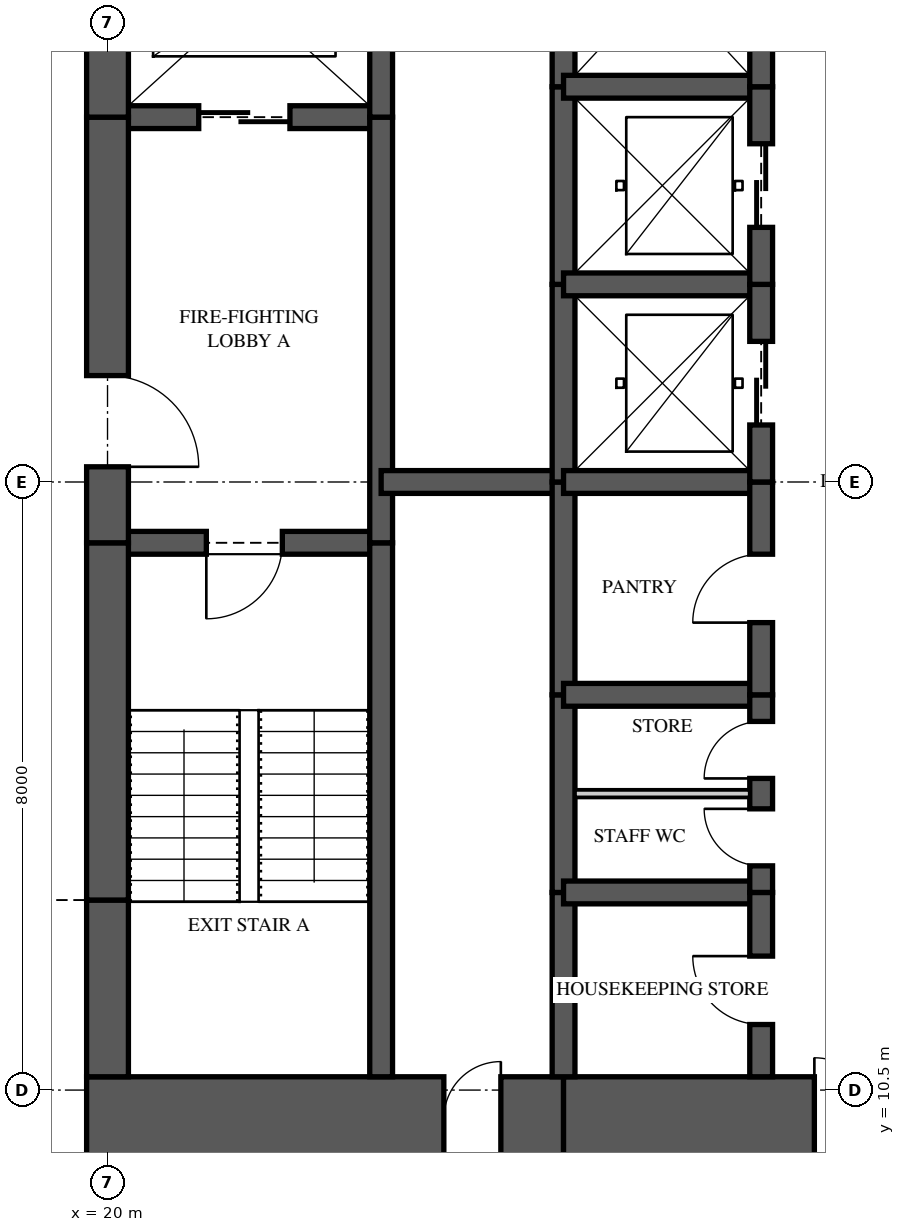
"""IFC4 building model, lengths in metres.
Left out: names, types, materials, properties, quantities, classifications, styles, units other than length and angle.
Written with IfcOpenShell. Run it as: python <this file> out.ifc"""

import sys

from ifc_helpers import new_model, si_unit, direction, frame, frame_2d, origin, place, context, subcontext, project, spatial, rectangle, extrude, element, fill, save


model = new_model("IFC4")
c1 = context("Model", 3, precision=1e-05, world=origin(), true_north=direction((0.0, 1.0)))
c2 = subcontext(c1, "Body", "Model", "MODEL_VIEW")
j1 = project(units=[si_unit("LENGTHUNIT", "METRE"), si_unit("PLANEANGLEUNIT", "RADIAN")], contexts=[c1])
p1 = place(None, origin())
s1 = spatial("IfcSite", under=j1, at=p1, CompositionType="ELEMENT")
p2 = place(p1, origin())
s2 = spatial("IfcBuilding", under=s1, at=p2, CompositionType="ELEMENT")
p3 = place(p2, frame((0.0, 0.0, 224.95)))
s3 = spatial("IfcBuildingStorey", under=s2, at=p3, CompositionType="ELEMENT", Elevation=224.95)
p4 = place(p3, frame((19.725, 10.125, 0.0), z_axis=(0.0, 0.0, 1.0), x_axis=(1.0, 0.0, 0.0)))
e1 = element("IfcWall", 1, at=p4, inside=s3, PredefinedType="SHEAR", context=c2, shape_type="SweptSolid", body=[
    extrude(rectangle(XDim=6.275, YDim=1.1, at=frame_2d((3.137, 0.0))), origin(), (0.0, 0.0, 1.0), 3.5),
])
p5 = place(p4, frame((4.7, 0.0, 0.0)))
e2 = element("IfcOpeningElement", 2, at=p5, cuts=e1, PredefinedType="OPENING", context=c2, shape_type="SweptSolid", body=[
    extrude(rectangle(XDim=0.75, YDim=2.1, at=frame_2d((0.375, 1.05))), frame((0.0, 0.56, 0.0), z_axis=(0.0, -1.0, 0.0), x_axis=(1.0, 0.0, 0.0)), (0.0, 0.0, 1.0), 1.12),
])
p6 = place(p3, frame((26.0, 10.125, 0.0), z_axis=(0.0, 0.0, 1.0), x_axis=(1.0, 0.0, 0.0)))
e3 = element("IfcWall", 3, at=p6, inside=s3, PredefinedType="SHEAR", context=c2, shape_type="SweptSolid", body=[
    extrude(rectangle(XDim=5.6, YDim=1.1, at=frame_2d((2.8, 0.0))), origin(), (0.0, 0.0, 1.0), 3.5),
])
p7 = place(p6, frame((3.3, 0.0, 0.0)))
e4 = element("IfcOpeningElement", 4, at=p7, cuts=e3, PredefinedType="OPENING", context=c2, shape_type="SweptSolid", body=[
    extrude(rectangle(XDim=1.6, YDim=2.1, at=frame_2d((0.8, 1.05))), frame((0.0, 0.56, 0.0), z_axis=(0.0, -1.0, 0.0), x_axis=(1.0, 0.0, 0.0)), (0.0, 0.0, 1.0), 1.12),
])
p8 = place(p3, frame((20.0, 26.325, 0.0), z_axis=(0.0, 0.0, 1.0), x_axis=(0.0, -1.0, 0.0)))
e5 = element("IfcWall", 5, at=p8, inside=s3, PredefinedType="SHEAR", context=c2, shape_type="SweptSolid", body=[
    extrude(rectangle(XDim=3.025, YDim=0.55, at=frame_2d((1.512, 0.0))), origin(), (0.0, 0.0, 1.0), 3.5),
])
p9 = place(p3, frame((20.0, 23.3, 0.0), z_axis=(0.0, 0.0, 1.0), x_axis=(0.0, -1.0, 0.0)))
e6 = element("IfcWall", 6, at=p9, inside=s3, PredefinedType="SHEAR", context=c2, shape_type="SweptSolid", body=[
    extrude(rectangle(XDim=5.6, YDim=0.55, at=frame_2d((2.8, 0.0))), origin(), (0.0, 0.0, 1.0), 3.5),
])
p10 = place(p9, frame((3.4, 0.0, 0.0)))
e7 = element("IfcOpeningElement", 7, at=p10, cuts=e6, PredefinedType="OPENING", context=c2, shape_type="SweptSolid", body=[
    extrude(rectangle(XDim=1.2, YDim=2.2, at=frame_2d((0.6, 1.1))), frame((0.0, 0.285, 0.0), z_axis=(0.0, -1.0, 0.0), x_axis=(1.0, 0.0, 0.0)), (0.0, 0.0, 1.0), 0.57),
])
p11 = place(p3, frame((20.0, 17.7, 0.0), z_axis=(0.0, 0.0, 1.0), x_axis=(0.0, -1.0, 0.0)))
e8 = element("IfcWall", 8, at=p11, inside=s3, PredefinedType="SHEAR", context=c2, shape_type="SweptSolid", body=[
    extrude(rectangle(XDim=4.7, YDim=0.55, at=frame_2d((2.35, 0.0))), origin(), (0.0, 0.0, 1.0), 3.5),
])
p12 = place(p3, frame((20.0, 13.0, 0.0), z_axis=(0.0, 0.0, 1.0), x_axis=(0.0, -1.0, 0.0)))
e9 = element("IfcWall", 9, at=p12, inside=s3, PredefinedType="SHEAR", context=c2, shape_type="SweptSolid", body=[
    extrude(rectangle(XDim=2.325, YDim=0.55, at=frame_2d((1.163, 0.0))), origin(), (0.0, 0.0, 1.0), 3.5),
])
p13 = place(p3, frame((23.6, 10.675, 0.0), z_axis=(0.0, 0.0, 1.0), x_axis=(0.0, 1.0, 0.0)))
e10 = element("IfcWall", 10, at=p13, inside=s3, PredefinedType="SHEAR", context=c2, shape_type="SweptSolid", body=[
    extrude(rectangle(XDim=7.025, YDim=0.3, at=frame_2d((3.512, 0.0))), origin(), (0.0, 0.0, 1.0), 3.5),
])
p14 = place(p3, frame((23.6, 17.7, 0.0), z_axis=(0.0, 0.0, 1.0), x_axis=(0.0, 1.0, 0.0)))
e11 = element("IfcWall", 11, at=p14, inside=s3, PredefinedType="SHEAR", context=c2, shape_type="SweptSolid", body=[
    extrude(rectangle(XDim=5.6, YDim=0.3, at=frame_2d((2.8, 0.0))), origin(), (0.0, 0.0, 1.0), 3.5),
])
p15 = place(p3, frame((23.6, 23.3, 0.0), z_axis=(0.0, 0.0, 1.0), x_axis=(0.0, 1.0, 0.0)))
e12 = element("IfcWall", 12, at=p15, inside=s3, PredefinedType="SHEAR", context=c2, shape_type="SweptSolid", body=[
    extrude(rectangle(XDim=3.025, YDim=0.3, at=frame_2d((1.512, 0.0))), origin(), (0.0, 0.0, 1.0), 3.5),
])
p16 = place(p3, frame((26.0, 10.675, 0.0), z_axis=(0.0, 0.0, 1.0), x_axis=(0.0, 1.0, 0.0)))
e13 = element("IfcWall", 13, at=p16, inside=s3, PredefinedType="SHEAR", context=c2, shape_type="SweptSolid", body=[
    extrude(rectangle(XDim=2.425, YDim=0.3, at=frame_2d((1.212, 0.0))), origin(), (0.0, 0.0, 1.0), 3.5),
])
p17 = place(p3, frame((26.0, 13.1, 0.0), z_axis=(0.0, 0.0, 1.0), x_axis=(0.0, 1.0, 0.0)))
e14 = element("IfcWall", 14, at=p17, inside=s3, PredefinedType="SHEAR", context=c2, shape_type="SweptSolid", body=[
    extrude(rectangle(XDim=2.6, YDim=0.3, at=frame_2d((1.3, 0.0))), origin(), (0.0, 0.0, 1.0), 3.5),
])
p18 = place(p3, frame((26.0, 15.7, 0.0), z_axis=(0.0, 0.0, 1.0), x_axis=(0.0, 1.0, 0.0)))
e15 = element("IfcWall", 15, at=p18, inside=s3, PredefinedType="SHEAR", context=c2, shape_type="SweptSolid", body=[
    extrude(rectangle(XDim=2.8, YDim=0.3, at=frame_2d((1.4, 0.0))), origin(), (0.0, 0.0, 1.0), 3.5),
])
p19 = place(p3, frame((26.0, 18.5, 0.0), z_axis=(0.0, 0.0, 1.0), x_axis=(0.0, 1.0, 0.0)))
e16 = element("IfcWall", 16, at=p19, inside=s3, PredefinedType="SHEAR", context=c2, shape_type="SweptSolid", body=[
    extrude(rectangle(XDim=2.6, YDim=0.3, at=frame_2d((1.3, 0.0))), origin(), (0.0, 0.0, 1.0), 3.5),
])
p20 = place(p3, frame((26.0, 21.1, 0.0), z_axis=(0.0, 0.0, 1.0), x_axis=(0.0, 1.0, 0.0)))
e17 = element("IfcWall", 17, at=p20, inside=s3, PredefinedType="SHEAR", context=c2, shape_type="SweptSolid", body=[
    extrude(rectangle(XDim=2.6, YDim=0.3, at=frame_2d((1.3, 0.0))), origin(), (0.0, 0.0, 1.0), 3.5),
])
p21 = place(p3, frame((26.0, 23.7, 0.0), z_axis=(0.0, 0.0, 1.0), x_axis=(0.0, 1.0, 0.0)))
e18 = element("IfcWall", 18, at=p21, inside=s3, PredefinedType="SHEAR", context=c2, shape_type="SweptSolid", body=[
    extrude(rectangle(XDim=2.625, YDim=0.3, at=frame_2d((1.312, 0.0))), origin(), (0.0, 0.0, 1.0), 3.5),
])
p22 = place(p3, frame((28.6, 10.675, 0.0), z_axis=(0.0, 0.0, 1.0), x_axis=(0.0, 1.0, 0.0)))
e19 = element("IfcWall", 19, at=p22, inside=s3, PredefinedType="SHEAR", context=c2, shape_type="SweptSolid", body=[
    extrude(rectangle(XDim=2.425, YDim=0.3, at=frame_2d((1.212, 0.0))), origin(), (0.0, 0.0, 1.0), 3.5),
])
p23 = place(p22, frame((0.688, 0.0, 0.0)))
e20 = element("IfcOpeningElement", 20, at=p23, cuts=e19, PredefinedType="OPENING", context=c2, shape_type="SweptSolid", body=[
    extrude(rectangle(XDim=0.9, YDim=2.1, at=frame_2d((0.45, 1.05))), frame((0.0, 0.16, 0.0), z_axis=(0.0, -1.0, 0.0), x_axis=(1.0, 0.0, 0.0)), (0.0, 0.0, 1.0), 0.32),
])
p24 = place(p3, frame((28.6, 13.1, 0.0), z_axis=(0.0, 0.0, 1.0), x_axis=(0.0, 1.0, 0.0)))
e21 = element("IfcWall", 21, at=p24, inside=s3, PredefinedType="SHEAR", context=c2, shape_type="SweptSolid", body=[
    extrude(rectangle(XDim=2.6, YDim=0.3, at=frame_2d((1.3, 0.0))), origin(), (0.0, 0.0, 1.0), 3.5),
])
p25 = place(p24, frame((0.35, 0.0, 0.0)))
e22 = element("IfcOpeningElement", 22, at=p25, cuts=e21, PredefinedType="OPENING", context=c2, shape_type="SweptSolid", body=[
    extrude(rectangle(XDim=0.75, YDim=2.1, at=frame_2d((0.375, 1.05))), frame((0.0, 0.16, 0.0), z_axis=(0.0, -1.0, 0.0), x_axis=(1.0, 0.0, 0.0)), (0.0, 0.0, 1.0), 0.32),
])
p26 = place(p24, frame((1.5, 0.0, 0.0)))
e23 = element("IfcOpeningElement", 23, at=p26, cuts=e21, PredefinedType="OPENING", context=c2, shape_type="SweptSolid", body=[
    extrude(rectangle(XDim=0.75, YDim=2.1, at=frame_2d((0.375, 1.05))), frame((0.0, 0.16, 0.0), z_axis=(0.0, -1.0, 0.0), x_axis=(1.0, 0.0, 0.0)), (0.0, 0.0, 1.0), 0.32),
])
p27 = place(p3, frame((28.6, 15.7, 0.0), z_axis=(0.0, 0.0, 1.0), x_axis=(0.0, 1.0, 0.0)))
e24 = element("IfcWall", 24, at=p27, inside=s3, PredefinedType="SHEAR", context=c2, shape_type="SweptSolid", body=[
    extrude(rectangle(XDim=2.8, YDim=0.3, at=frame_2d((1.4, 0.0))), origin(), (0.0, 0.0, 1.0), 3.5),
])
p28 = place(p27, frame((0.95, 0.0, 0.0)))
e25 = element("IfcOpeningElement", 25, at=p28, cuts=e24, PredefinedType="OPENING", context=c2, shape_type="SweptSolid", body=[
    extrude(rectangle(XDim=0.9, YDim=2.1, at=frame_2d((0.45, 1.05))), frame((0.0, 0.16, 0.0), z_axis=(0.0, -1.0, 0.0), x_axis=(1.0, 0.0, 0.0)), (0.0, 0.0, 1.0), 0.32),
])
p29 = place(p3, frame((28.6, 18.5, 0.0), z_axis=(0.0, 0.0, 1.0), x_axis=(0.0, 1.0, 0.0)))
e26 = element("IfcWall", 26, at=p29, inside=s3, PredefinedType="SHEAR", context=c2, shape_type="SweptSolid", body=[
    extrude(rectangle(XDim=2.6, YDim=0.3, at=frame_2d((1.3, 0.0))), origin(), (0.0, 0.0, 1.0), 3.5),
])
p30 = place(p29, frame((0.75, 0.0, 0.0)))
e27 = element("IfcOpeningElement", 27, at=p30, cuts=e26, PredefinedType="OPENING", context=c2, shape_type="SweptSolid", body=[
    extrude(rectangle(XDim=1.1, YDim=2.1, at=frame_2d((0.55, 1.05))), frame((0.0, 0.16, 0.0), z_axis=(0.0, -1.0, 0.0), x_axis=(1.0, 0.0, 0.0)), (0.0, 0.0, 1.0), 0.32),
])
p31 = place(p3, frame((28.6, 21.1, 0.0), z_axis=(0.0, 0.0, 1.0), x_axis=(0.0, 1.0, 0.0)))
e28 = element("IfcWall", 28, at=p31, inside=s3, PredefinedType="SHEAR", context=c2, shape_type="SweptSolid", body=[
    extrude(rectangle(XDim=2.6, YDim=0.3, at=frame_2d((1.3, 0.0))), origin(), (0.0, 0.0, 1.0), 3.5),
])
p32 = place(p31, frame((0.75, 0.0, 0.0)))
e29 = element("IfcOpeningElement", 29, at=p32, cuts=e28, PredefinedType="OPENING", context=c2, shape_type="SweptSolid", body=[
    extrude(rectangle(XDim=1.1, YDim=2.1, at=frame_2d((0.55, 1.05))), frame((0.0, 0.16, 0.0), z_axis=(0.0, -1.0, 0.0), x_axis=(1.0, 0.0, 0.0)), (0.0, 0.0, 1.0), 0.32),
])
p33 = place(p3, frame((28.6, 23.7, 0.0), z_axis=(0.0, 0.0, 1.0), x_axis=(0.0, 1.0, 0.0)))
e30 = element("IfcWall", 30, at=p33, inside=s3, PredefinedType="SHEAR", context=c2, shape_type="SweptSolid", body=[
    extrude(rectangle(XDim=2.625, YDim=0.3, at=frame_2d((1.312, 0.0))), origin(), (0.0, 0.0, 1.0), 3.5),
])
p34 = place(p33, frame((0.85, 0.0, 0.0)))
e31 = element("IfcOpeningElement", 31, at=p34, cuts=e30, PredefinedType="OPENING", context=c2, shape_type="SweptSolid", body=[
    extrude(rectangle(XDim=1.1, YDim=2.1, at=frame_2d((0.55, 1.05))), frame((0.0, 0.16, 0.0), z_axis=(0.0, -1.0, 0.0), x_axis=(1.0, 0.0, 0.0)), (0.0, 0.0, 1.0), 0.32),
])
p35 = place(p3, frame((20.0, 17.7, 0.0), z_axis=(0.0, 0.0, 1.0), x_axis=(1.0, 0.0, 0.0)))
e32 = element("IfcWall", 32, at=p35, inside=s3, PredefinedType="SHEAR", context=c2, shape_type="SweptSolid", body=[
    extrude(rectangle(XDim=3.6, YDim=0.3, at=frame_2d((1.8, 0.0))), origin(), (0.0, 0.0, 1.0), 3.5),
])
p36 = place(p35, frame((1.3, 0.0, 0.0)))
e33 = element("IfcOpeningElement", 33, at=p36, cuts=e32, PredefinedType="OPENING", context=c2, shape_type="SweptSolid", body=[
    extrude(rectangle(XDim=1.0, YDim=2.1, at=frame_2d((0.5, 1.05))), frame((0.0, 0.16, 0.0), z_axis=(0.0, -1.0, 0.0), x_axis=(1.0, 0.0, 0.0)), (0.0, 0.0, 1.0), 0.32),
])
p37 = place(p3, frame((20.0, 23.3, 0.0), z_axis=(0.0, 0.0, 1.0), x_axis=(1.0, 0.0, 0.0)))
e34 = element("IfcWall", 34, at=p37, inside=s3, PredefinedType="SHEAR", context=c2, shape_type="SweptSolid", body=[
    extrude(rectangle(XDim=3.6, YDim=0.3, at=frame_2d((1.8, 0.0))), origin(), (0.0, 0.0, 1.0), 3.5),
])
p38 = place(p37, frame((1.2, 0.0, 0.0)))
e35 = element("IfcOpeningElement", 35, at=p38, cuts=e34, PredefinedType="OPENING", context=c2, shape_type="SweptSolid", body=[
    extrude(rectangle(XDim=1.2, YDim=2.1, at=frame_2d((0.6, 1.05))), frame((0.0, 0.16, 0.0), z_axis=(0.0, -1.0, 0.0), x_axis=(1.0, 0.0, 0.0)), (0.0, 0.0, 1.0), 0.32),
])
p39 = place(p3, frame((23.6, 18.5, 0.0), z_axis=(0.0, 0.0, 1.0), x_axis=(1.0, 0.0, 0.0)))
e36 = element("IfcWall", 36, at=p39, inside=s3, PredefinedType="SHEAR", context=c2, shape_type="SweptSolid", body=[
    extrude(rectangle(XDim=2.4, YDim=0.3, at=frame_2d((1.2, 0.0))), origin(), (0.0, 0.0, 1.0), 3.5),
])
for number, where, z_axis, x_axis in (
    (37, (26.0, 13.1, 0.0), (0.0, 0.0, 1.0), (1.0, 0.0, 0.0)),
    (38, (26.0, 15.7, 0.0), (0.0, 0.0, 1.0), (1.0, 0.0, 0.0)),
    (39, (26.0, 18.5, 0.0), (0.0, 0.0, 1.0), (1.0, 0.0, 0.0)),
    (40, (26.0, 21.1, 0.0), (0.0, 0.0, 1.0), (1.0, 0.0, 0.0)),
    (41, (26.0, 23.7, 0.0), (0.0, 0.0, 1.0), (1.0, 0.0, 0.0)),
):
    element("IfcWall", number, at=place(p3, frame(where, z_axis=z_axis, x_axis=x_axis)), inside=s3, PredefinedType="SHEAR", context=c2, shape_type="SweptSolid", body=[
        extrude(rectangle(XDim=2.6, YDim=0.3, at=frame_2d((1.3, 0.0))), origin(), (0.0, 0.0, 1.0), 3.5),
    ])
p40 = place(p3, frame((26.15, 14.4, 0.0), z_axis=(0.0, 0.0, 1.0), x_axis=(1.0, 0.0, 0.0)))
e42 = element("IfcWall", 42, at=p40, inside=s3, PredefinedType="PARTITIONING", context=c2, shape_type="SweptSolid", body=[
    extrude(rectangle(XDim=2.3, YDim=0.1, at=frame_2d((1.15, 0.0))), origin(), (0.0, 0.0, 1.0), 3.26),
])
p41 = place(p36, frame((1.0, 0.0, 0.0), z_axis=(0.0, 0.0, 1.0), x_axis=(-1.0, 0.0, 0.0)))
e43 = element("IfcDoor", 43, at=p41, inside=s3, OperationType="SINGLE_SWING_RIGHT", PredefinedType="DOOR", context=c2, shape_type="SweptSolid", body=[
    extrude(rectangle(XDim=1.0, YDim=2.1, at=frame_2d((0.5, 1.05))), frame((0.0, 0.025, 0.0), z_axis=(0.0, -1.0, 0.0), x_axis=(1.0, 0.0, 0.0)), (0.0, 0.0, 1.0), 0.05),
])
fill(e33, e43)
p42 = place(p10, origin())
e44 = element("IfcDoor", 44, at=p42, inside=s3, OperationType="SINGLE_SWING_RIGHT", PredefinedType="DOOR", context=c2, shape_type="SweptSolid", body=[
    extrude(rectangle(XDim=1.2, YDim=2.2, at=frame_2d((0.6, 1.1))), frame((0.0, 0.025, 0.0), z_axis=(0.0, -1.0, 0.0), x_axis=(1.0, 0.0, 0.0)), (0.0, 0.0, 1.0), 0.05),
])
fill(e7, e44)
p43 = place(p38, origin())
e45 = element("IfcDoor", 45, at=p43, inside=s3, OperationType="SLIDING_TO_LEFT", PredefinedType="DOOR", context=c2, shape_type="SweptSolid", body=[
    extrude(rectangle(XDim=1.2, YDim=2.1, at=frame_2d((0.6, 1.05))), frame((0.0, 0.025, 0.0), z_axis=(0.0, -1.0, 0.0), x_axis=(1.0, 0.0, 0.0)), (0.0, 0.0, 1.0), 0.05),
])
fill(e35, e45)
p44 = place(p30, origin())
e46 = element("IfcDoor", 46, at=p44, inside=s3, OperationType="SLIDING_TO_LEFT", PredefinedType="DOOR", context=c2, shape_type="SweptSolid", body=[
    extrude(rectangle(XDim=1.1, YDim=2.1, at=frame_2d((0.55, 1.05))), frame((0.0, 0.025, 0.0), z_axis=(0.0, -1.0, 0.0), x_axis=(1.0, 0.0, 0.0)), (0.0, 0.0, 1.0), 0.05),
])
fill(e27, e46)
p45 = place(p32, origin())
e47 = element("IfcDoor", 47, at=p45, inside=s3, OperationType="SLIDING_TO_LEFT", PredefinedType="DOOR", context=c2, shape_type="SweptSolid", body=[
    extrude(rectangle(XDim=1.1, YDim=2.1, at=frame_2d((0.55, 1.05))), frame((0.0, 0.025, 0.0), z_axis=(0.0, -1.0, 0.0), x_axis=(1.0, 0.0, 0.0)), (0.0, 0.0, 1.0), 0.05),
])
fill(e29, e47)
p46 = place(p23, origin())
e48 = element("IfcDoor", 48, at=p46, inside=s3, OperationType="SINGLE_SWING_RIGHT", PredefinedType="DOOR", context=c2, shape_type="SweptSolid", body=[
    extrude(rectangle(XDim=0.9, YDim=2.1, at=frame_2d((0.45, 1.05))), frame((0.0, 0.025, 0.0), z_axis=(0.0, -1.0, 0.0), x_axis=(1.0, 0.0, 0.0)), (0.0, 0.0, 1.0), 0.05),
])
fill(e20, e48)
p47 = place(p25, origin())
e49 = element("IfcDoor", 49, at=p47, inside=s3, OperationType="SINGLE_SWING_RIGHT", PredefinedType="DOOR", context=c2, shape_type="SweptSolid", body=[
    extrude(rectangle(XDim=0.75, YDim=2.1, at=frame_2d((0.375, 1.05))), frame((0.0, 0.025, 0.0), z_axis=(0.0, -1.0, 0.0), x_axis=(1.0, 0.0, 0.0)), (0.0, 0.0, 1.0), 0.05),
])
fill(e22, e49)
p48 = place(p26, origin())
e50 = element("IfcDoor", 50, at=p48, inside=s3, OperationType="SINGLE_SWING_LEFT", PredefinedType="DOOR", context=c2, shape_type="SweptSolid", body=[
    extrude(rectangle(XDim=0.75, YDim=2.1, at=frame_2d((0.375, 1.05))), frame((0.0, 0.025, 0.0), z_axis=(0.0, -1.0, 0.0), x_axis=(1.0, 0.0, 0.0)), (0.0, 0.0, 1.0), 0.05),
])
fill(e23, e50)
p49 = place(p28, origin())
e51 = element("IfcDoor", 51, at=p49, inside=s3, OperationType="SINGLE_SWING_LEFT", PredefinedType="DOOR", context=c2, shape_type="SweptSolid", body=[
    extrude(rectangle(XDim=0.9, YDim=2.1, at=frame_2d((0.45, 1.05))), frame((0.0, 0.025, 0.0), z_axis=(0.0, -1.0, 0.0), x_axis=(1.0, 0.0, 0.0)), (0.0, 0.0, 1.0), 0.05),
])
fill(e25, e51)
p50 = place(p7, origin())
e52 = element("IfcDoor", 52, at=p50, inside=s3, OperationType="DOUBLE_DOOR_SINGLE_SWING", PredefinedType="DOOR", context=c2, shape_type="SweptSolid", body=[
    extrude(rectangle(XDim=1.6, YDim=2.1, at=frame_2d((0.8, 1.05))), frame((0.0, 0.025, 0.0), z_axis=(0.0, -1.0, 0.0), x_axis=(1.0, 0.0, 0.0)), (0.0, 0.0, 1.0), 0.05),
])
fill(e4, e52)
p51 = place(p5, origin())
e53 = element("IfcDoor", 53, at=p51, inside=s3, OperationType="SINGLE_SWING_RIGHT", PredefinedType="DOOR", context=c2, shape_type="SweptSolid", body=[
    extrude(rectangle(XDim=0.75, YDim=2.1, at=frame_2d((0.375, 1.05))), frame((0.0, 0.025, 0.0), z_axis=(0.0, -1.0, 0.0), x_axis=(1.0, 0.0, 0.0)), (0.0, 0.0, 1.0), 0.05),
])
fill(e2, e53)
save(model, sys.argv[1])
